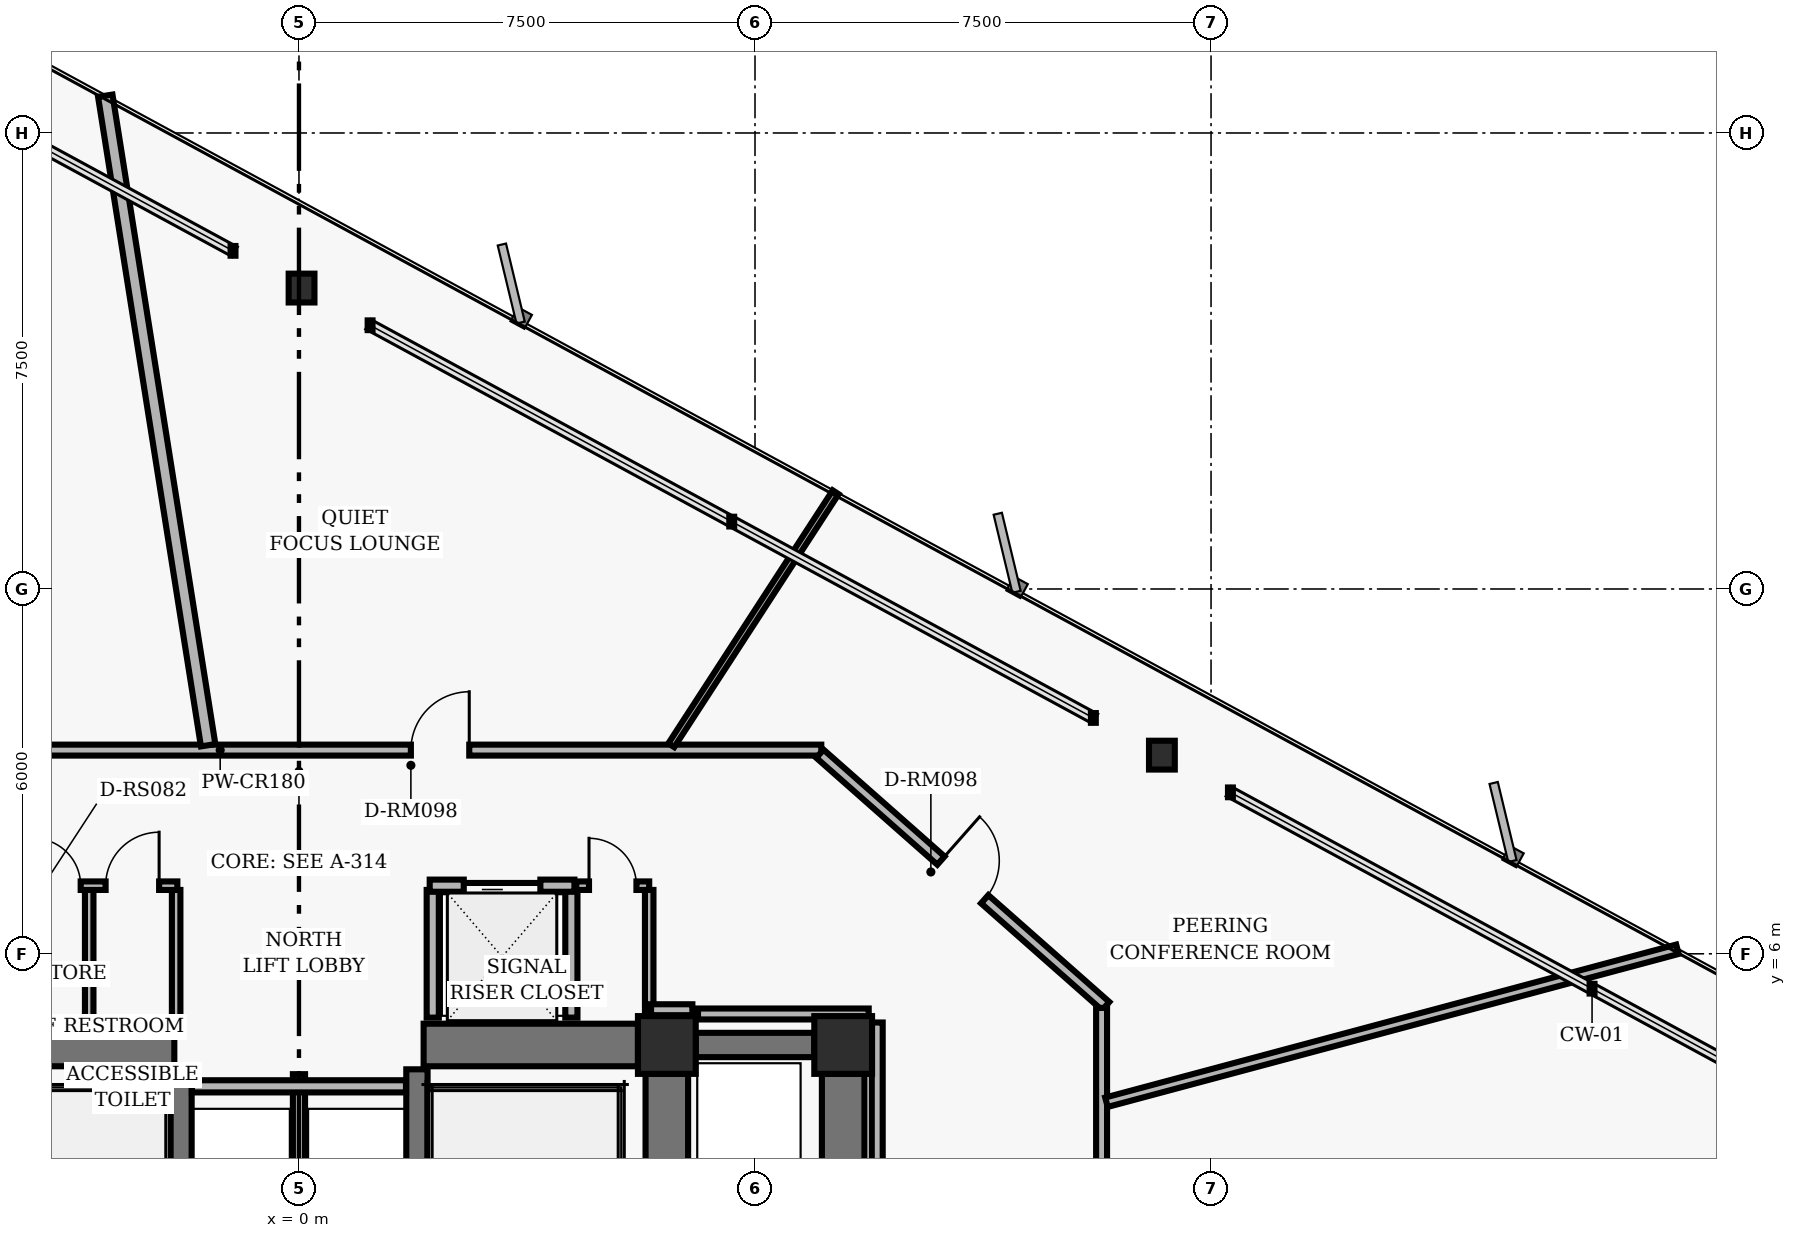
"""IFC4 building model, lengths in metres.
Left out: names, types, materials, properties, quantities, classifications, styles, units other than length and angle.
Written with IfcOpenShell. Run it as: python <this file> out.ifc"""

import sys

from ifc_helpers import new_model, si_unit, direction, frame, frame_2d, origin, origin_2d, place, context, subcontext, project, spatial, rectangle, hollow_rectangle, i_section, extrude, element, fill, save


model = new_model("IFC4")
c1 = context("Model", 3, precision=1e-05, world=origin(), true_north=direction((0.0, 1.0)))
c2 = subcontext(c1, "Body", "Model", "MODEL_VIEW")
j1 = project(units=[si_unit("LENGTHUNIT", "METRE"), si_unit("PLANEANGLEUNIT", "RADIAN")], contexts=[c1])
p1 = place(None, origin())
s1 = spatial("IfcSite", under=j1, at=p1, CompositionType="ELEMENT")
p2 = place(p1, origin())
s2 = spatial("IfcBuilding", under=s1, at=p2, CompositionType="ELEMENT")
p3 = place(p2, frame((0.0, 0.0, 32.32)))
s3 = spatial("IfcBuildingStorey", under=s2, at=p3, CompositionType="ELEMENT", Elevation=32.32)
for number, where, z_axis, x_axis in (
    (1, (6.05, 4.5, 0.0), (0.0, 0.0, 1.0), (1.0, 0.0, 0.0)),
    (2, (8.95, 4.5, 0.0), (0.0, 0.0, 1.0), (1.0, 0.0, 0.0)),
):
    element("IfcColumn", number, at=place(p3, frame(where, z_axis=z_axis, x_axis=x_axis)), inside=s3, PredefinedType="COLUMN", context=c2, shape_type="SweptSolid", body=[
        extrude(hollow_rectangle(XDim=0.95, YDim=0.95, WallThickness=0.06, InnerFilletRadius=0.02, OuterFilletRadius=0.04, at=origin_2d()), origin(), (0.0, 0.0, 1.0), 3.36),
    ])
p4 = place(p3, frame((6.05, 0.475, 0.0), z_axis=(0.0, 0.0, 1.0), x_axis=(0.0, 1.0, 0.0)))
e3 = element("IfcWall", 3, at=p4, inside=s3, PredefinedType="SHEAR", context=c2, shape_type="SweptSolid", body=[
    extrude(rectangle(XDim=3.55, YDim=0.7, at=frame_2d((1.775, 0.0))), origin(), (0.0, 0.0, 1.0), 3.098),
])
for number, where, z_axis, x_axis in (
    (4, (-1.94, -4.1, 0.0), (0.0, 0.0, 1.0), (0.0, 1.0, 0.0)),
    (5, (1.94, -4.1, 0.0), (0.0, 0.0, 1.0), (0.0, 1.0, 0.0)),
):
    element("IfcWall", number, at=place(p3, frame(where, z_axis=z_axis, x_axis=x_axis)), inside=s3, PredefinedType="SHEAR", context=c2, shape_type="SweptSolid", body=[
        extrude(rectangle(XDim=8.2, YDim=0.35, at=frame_2d((4.1, 0.0))), origin(), (0.0, 0.0, 1.0), 3.098),
    ])
for number, where, z_axis, x_axis in (
    (6, (-5.575, 4.5, 0.0), (0.0, 0.0, 1.0), (1.0, 0.0, 0.0)),
    (7, (2.05, 4.5, 0.0), (0.0, 0.0, 1.0), (1.0, 0.0, 0.0)),
):
    element("IfcWall", number, at=place(p3, frame(where, z_axis=z_axis, x_axis=x_axis)), inside=s3, PredefinedType="SHEAR", context=c2, shape_type="SweptSolid", body=[
        extrude(rectangle(XDim=3.525, YDim=0.7, at=frame_2d((1.762, 0.0))), origin(), (0.0, 0.0, 1.0), 3.098),
    ])
p5 = place(p3, frame((8.95, -3.825, 0.0), z_axis=(0.0, 0.0, 1.0), x_axis=(0.0, 1.0, 0.0)))
e8 = element("IfcWall", 8, at=p5, inside=s3, PredefinedType="SHEAR", context=c2, shape_type="SweptSolid", body=[
    extrude(rectangle(XDim=7.85, YDim=0.7, at=frame_2d((3.925, 0.0))), origin(), (0.0, 0.0, 1.0), 3.098),
])
p6 = place(p3, frame((6.525, 4.5, 0.0), z_axis=(0.0, 0.0, 1.0), x_axis=(1.0, 0.0, 0.0)))
e9 = element("IfcWall", 9, at=p6, inside=s3, PredefinedType="SHEAR", context=c2, shape_type="SweptSolid", body=[
    extrude(rectangle(XDim=1.95, YDim=0.4, at=frame_2d((0.975, 0.0))), origin(), (0.0, 0.0, 1.0), 3.098),
])
for number, where, z_axis, x_axis in (
    (10, (14.192, 9.267, 0.0), (0.0, 0.0, 1.0), (1.0, 0.0, 0.0)),
    (11, (0.043, 16.949, 0.0), (0.0, 0.0, 1.0), (1.0, 0.0, 0.0)),
):
    element("IfcColumn", number, at=place(p3, frame(where, z_axis=z_axis, x_axis=x_axis)), inside=s3, PredefinedType="COLUMN", context=c2, shape_type="SweptSolid", body=[
        extrude(i_section(OverallWidth=0.424, OverallDepth=0.474, WebThickness=0.048, FlangeThickness=0.077, FilletRadius=0.025, at=origin_2d()), origin(), (0.0, 0.0, 1.0), 3.36),
    ])
p7 = place(p3, frame((0.0, 1.25, 0.0), z_axis=(0.0, 0.0, 1.0), x_axis=(0.0, 1.0, 0.0)))
e12 = element("IfcWall", 12, at=p7, inside=s3, PredefinedType="PARTITIONING", context=c2, shape_type="SweptSolid", body=[
    extrude(rectangle(XDim=2.77, YDim=0.2, at=frame_2d((1.385, 0.0))), origin(), (0.0, 0.0, 1.0), 3.073),
])
p8 = place(p3, frame((-1.76, 3.82, 0.0), z_axis=(0.0, 0.0, 1.0), x_axis=(1.0, 0.0, 0.0)))
e13 = element("IfcWall", 13, at=p8, inside=s3, PredefinedType="PARTITIONING", context=c2, shape_type="SweptSolid", body=[
    extrude(rectangle(XDim=3.52, YDim=0.2, at=frame_2d((1.76, 0.0))), origin(), (0.0, 0.0, 1.0), 3.073),
])
for number, where, z_axis, x_axis in (
    (14, (2.2, 4.95, 0.0), (0.0, 0.0, 1.0), (0.0, 1.0, 0.0)),
    (15, (4.48, 4.95, 0.0), (0.0, 0.0, 1.0), (0.0, 1.0, 0.0)),
):
    element("IfcWall", number, at=place(p3, frame(where, z_axis=z_axis, x_axis=x_axis)), inside=s3, PredefinedType="PARTITIONING", context=c2, shape_type="SweptSolid", body=[
        extrude(rectangle(XDim=2.1, YDim=0.2, at=frame_2d((1.05, 0.0))), origin(), (0.0, 0.0, 1.0), 3.073),
    ])
p9 = place(p3, frame((2.15, 7.12, 0.0), z_axis=(0.0, 0.0, 1.0), x_axis=(1.0, 0.0, 0.0)))
e16 = element("IfcWall", 16, at=p9, inside=s3, PredefinedType="PARTITIONING", context=c2, shape_type="SweptSolid", body=[
    extrude(rectangle(XDim=2.38, YDim=0.2, at=frame_2d((1.19, 0.0))), origin(), (0.0, 0.0, 1.0), 3.073),
])
p10 = place(p9, frame((0.56, 0.0, 0.0)))
e17 = element("IfcOpeningElement", 17, at=p10, cuts=e16, PredefinedType="OPENING", context=c2, shape_type="SweptSolid", body=[
    extrude(rectangle(XDim=1.26, YDim=2.06, at=frame_2d((0.63, 1.03))), frame((0.0, 0.11, 0.0), z_axis=(0.0, -1.0, 0.0), x_axis=(1.0, 0.0, 0.0)), (0.0, 0.0, 1.0), 0.22),
])
for number, where, z_axis, x_axis in (
    (18, (-3.45, 4.95, 0.0), (0.0, 0.0, 1.0), (0.0, 1.0, 0.0)),
    (19, (-2.02, 4.95, 0.0), (0.0, 0.0, 1.0), (0.0, 1.0, 0.0)),
):
    element("IfcWall", number, at=place(p3, frame(where, z_axis=z_axis, x_axis=x_axis)), inside=s3, PredefinedType="PARTITIONING", context=c2, shape_type="SweptSolid", body=[
        extrude(rectangle(XDim=2.1, YDim=0.14, at=frame_2d((1.05, 0.0))), origin(), (0.0, 0.0, 1.0), 3.073),
    ])
p11 = place(p3, frame((-5.52, 7.12, 0.0), z_axis=(0.0, 0.0, 1.0), x_axis=(1.0, 0.0, 0.0)))
e20 = element("IfcWall", 20, at=p11, inside=s3, PredefinedType="PARTITIONING", context=c2, shape_type="SweptSolid", body=[
    extrude(rectangle(XDim=3.52, YDim=0.14, at=frame_2d((1.76, 0.0))), origin(), (0.0, 0.0, 1.0), 3.073),
])
p12 = place(p11, frame((0.14, 0.0, 0.0)))
e21 = element("IfcOpeningElement", 21, at=p12, cuts=e20, PredefinedType="OPENING", context=c2, shape_type="SweptSolid", body=[
    extrude(rectangle(XDim=0.78, YDim=2.01, at=frame_2d((0.39, 1.005))), frame((0.0, 0.08, 0.0), z_axis=(0.0, -1.0, 0.0), x_axis=(1.0, 0.0, 0.0)), (0.0, 0.0, 1.0), 0.16),
])
p13 = place(p11, frame((1.15, 0.0, 0.0)))
e22 = element("IfcOpeningElement", 22, at=p13, cuts=e20, PredefinedType="OPENING", context=c2, shape_type="SweptSolid", body=[
    extrude(rectangle(XDim=0.78, YDim=2.01, at=frame_2d((0.39, 1.005))), frame((0.0, 0.08, 0.0), z_axis=(0.0, -1.0, 0.0), x_axis=(1.0, 0.0, 0.0)), (0.0, 0.0, 1.0), 0.16),
])
p14 = place(p11, frame((2.34, 0.0, 0.0)))
e23 = element("IfcOpeningElement", 23, at=p14, cuts=e20, PredefinedType="OPENING", context=c2, shape_type="SweptSolid", body=[
    extrude(rectangle(XDim=0.88, YDim=2.02, at=frame_2d((0.44, 1.01))), frame((0.0, 0.08, 0.0), z_axis=(0.0, -1.0, 0.0), x_axis=(1.0, 0.0, 0.0)), (0.0, 0.0, 1.0), 0.16),
])
p15 = place(p3, frame((5.76, 4.95, 0.0), z_axis=(0.0, 0.0, 1.0), x_axis=(0.0, 1.0, 0.0)))
e24 = element("IfcWall", 24, at=p15, inside=s3, PredefinedType="PARTITIONING", context=c2, shape_type="SweptSolid", body=[
    extrude(rectangle(XDim=2.1, YDim=0.14, at=frame_2d((1.05, 0.0))), origin(), (0.0, 0.0, 1.0), 3.073),
])
p16 = place(p3, frame((4.56, 7.12, 0.0), z_axis=(0.0, 0.0, 1.0), x_axis=(1.0, 0.0, 0.0)))
e25 = element("IfcWall", 25, at=p16, inside=s3, PredefinedType="PARTITIONING", context=c2, shape_type="SweptSolid", body=[
    extrude(rectangle(XDim=1.2, YDim=0.14, at=frame_2d((0.6, 0.0))), origin(), (0.0, 0.0, 1.0), 3.073),
])
p17 = place(p16, frame((0.21, 0.0, 0.0)))
e26 = element("IfcOpeningElement", 26, at=p17, cuts=e25, PredefinedType="OPENING", context=c2, shape_type="SweptSolid", body=[
    extrude(rectangle(XDim=0.78, YDim=2.01, at=frame_2d((0.39, 1.005))), frame((0.0, 0.08, 0.0), z_axis=(0.0, -1.0, 0.0), x_axis=(1.0, 0.0, 0.0)), (0.0, 0.0, 1.0), 0.16),
])
p18 = place(p3, frame((-8.59, 9.35, 0.0), z_axis=(0.0, 0.0, 1.0), x_axis=(1.0, 0.0, 0.0)))
e27 = element("IfcWall", 27, at=p18, inside=s3, PredefinedType="PARTITIONING", context=c2, shape_type="SweptSolid", body=[
    extrude(rectangle(XDim=17.18, YDim=0.18, at=frame_2d((8.59, 0.0))), origin(), (0.0, 0.0, 1.0), 2.587),
])
p19 = place(p18, frame((10.43, 0.0, 0.0)))
e28 = element("IfcOpeningElement", 28, at=p19, cuts=e27, PredefinedType="OPENING", context=c2, shape_type="SweptSolid", body=[
    extrude(rectangle(XDim=0.96, YDim=2.02, at=frame_2d((0.48, 1.01))), frame((0.0, 0.1, 0.0), z_axis=(0.0, -1.0, 0.0), x_axis=(1.0, 0.0, 0.0)), (0.0, 0.0, 1.0), 0.2),
])
p20 = place(p18, frame((3.198, 0.0, 0.0)))
e29 = element("IfcOpeningElement", 29, at=p20, cuts=e27, PredefinedType="OPENING", context=c2, shape_type="SweptSolid", body=[
    extrude(rectangle(XDim=0.96, YDim=2.02, at=frame_2d((0.48, 1.01))), frame((0.0, 0.1, 0.0), z_axis=(0.0, -1.0, 0.0), x_axis=(1.0, 0.0, 0.0)), (0.0, 0.0, 1.0), 0.2),
])
p21 = place(p3, frame((8.567, 9.29, 0.0), z_axis=(0.0, 0.0, 1.0), x_axis=(0.749626463267, -0.66186113768, 0.0)))
e30 = element("IfcWall", 30, at=p21, inside=s3, PredefinedType="PARTITIONING", context=c2, shape_type="SweptSolid", body=[
    extrude(rectangle(XDim=6.27, YDim=0.18, at=frame_2d((3.135, 0.0))), origin(), (0.0, 0.0, 1.0), 2.587),
])
p22 = place(p21, frame((2.655, 0.0, 0.0)))
e31 = element("IfcOpeningElement", 31, at=p22, cuts=e30, PredefinedType="OPENING", context=c2, shape_type="SweptSolid", body=[
    extrude(rectangle(XDim=0.96, YDim=2.02, at=frame_2d((0.48, 1.01))), frame((0.0, 0.1, 0.0), z_axis=(0.0, -1.0, 0.0), x_axis=(1.0, 0.0, 0.0)), (0.0, 0.0, 1.0), 0.2),
])
p23 = place(p3, frame((13.2, 5.11, 0.0), z_axis=(0.0, 0.0, 1.0), x_axis=(0.0, -1.0, 0.0)))
e32 = element("IfcWall", 32, at=p23, inside=s3, PredefinedType="PARTITIONING", context=c2, shape_type="SweptSolid", body=[
    extrude(rectangle(XDim=10.22, YDim=0.18, at=frame_2d((5.11, 0.0))), origin(), (0.0, 0.0, 1.0), 3.073),
])
p24 = place(p23, frame((5.277, 0.0, 0.0)))
e33 = element("IfcOpeningElement", 33, at=p24, cuts=e32, PredefinedType="OPENING", context=c2, shape_type="SweptSolid", body=[
    extrude(rectangle(XDim=0.96, YDim=2.02, at=frame_2d((0.48, 1.01))), frame((0.0, 0.1, 0.0), z_axis=(0.0, -1.0, 0.0), x_axis=(1.0, 0.0, 0.0)), (0.0, 0.0, 1.0), 0.2),
])
p25 = place(p3, frame((9.51, -4.87, 0.0), z_axis=(0.0, 0.0, 1.0), x_axis=(0.0, 1.0, 0.0)))
e34 = element("IfcWall", 34, at=p25, inside=s3, PredefinedType="PARTITIONING", context=c2, shape_type="SweptSolid", body=[
    extrude(rectangle(XDim=9.74, YDim=0.18, at=frame_2d((4.87, 0.0))), origin(), (0.0, 0.0, 1.0), 3.073),
])
p26 = place(p3, frame((9.37, 5.01, 0.0), z_axis=(0.0, 0.0, 1.0), x_axis=(-1.0, 0.0, 0.0)))
e35 = element("IfcWall", 35, at=p26, inside=s3, PredefinedType="PARTITIONING", context=c2, shape_type="SweptSolid", body=[
    extrude(rectangle(XDim=2.808, YDim=0.18, at=frame_2d((1.404, 0.0))), origin(), (0.0, 0.0, 1.0), 3.073),
])
p27 = place(p3, frame((6.47, 5.08, 0.0), z_axis=(0.0, 0.0, 1.0), x_axis=(-1.0, 0.0, 0.0)))
e36 = element("IfcWall", 36, at=p27, inside=s3, PredefinedType="PARTITIONING", context=c2, shape_type="SweptSolid", body=[
    extrude(rectangle(XDim=0.68, YDim=0.18, at=frame_2d((0.34, 0.0))), origin(), (0.0, 0.0, 1.0), 3.073),
])
p28 = place(p3, frame((13.28, 3.558, 0.0), z_axis=(0.0, 0.0, 1.0), x_axis=(0.965926641133, 0.258816004043, 0.0)))
e37 = element("IfcWall", 37, at=p28, inside=s3, PredefinedType="PARTITIONING", context=c2, shape_type="SweptSolid", body=[
    extrude(rectangle(XDim=9.722, YDim=0.16, at=frame_2d((4.861, 0.0))), origin(), (0.0, 0.0, 1.0), 3.073),
])
p29 = place(p3, frame((6.124, 9.43, 0.0), z_axis=(0.0, 0.0, 1.0), x_axis=(0.544668366902, 0.838651518866, 0.0)))
e38 = element("IfcWall", 38, at=p29, inside=s3, PredefinedType="MOVABLE", context=c2, shape_type="SweptSolid", body=[
    extrude(rectangle(XDim=4.962, YDim=0.115, at=frame_2d((2.481, 0.0))), origin(), (0.0, 0.0, 1.0), 3.073),
])
p30 = place(p3, frame((-1.494, 9.43, 0.0), z_axis=(0.0, 0.0, 1.0), x_axis=(-0.156418067091, 0.987690937636, 0.0)))
e39 = element("IfcWall", 39, at=p30, inside=s3, PredefinedType="PARTITIONING", context=c2, shape_type="SweptSolid", body=[
    extrude(rectangle(XDim=10.816, YDim=0.24, at=frame_2d((5.408, 0.0))), origin(), (0.0, 0.0, 1.0), 3.073),
])
p31 = place(p10, origin())
e40 = element("IfcDoor", 40, at=p31, inside=s3, OperationType="SLIDING_TO_LEFT", PredefinedType="DOOR", context=c2, shape_type="SweptSolid", body=[
    extrude(rectangle(XDim=1.26, YDim=2.06, at=frame_2d((0.63, 1.03))), frame((0.0, 0.025, 0.0), z_axis=(0.0, -1.0, 0.0), x_axis=(1.0, 0.0, 0.0)), (0.0, 0.0, 1.0), 0.05),
])
fill(e17, e40)
p32 = place(p13, origin())
e41 = element("IfcDoor", 41, at=p32, inside=s3, OperationType="SINGLE_SWING_LEFT", PredefinedType="DOOR", context=c2, shape_type="SweptSolid", body=[
    extrude(rectangle(XDim=0.78, YDim=2.01, at=frame_2d((0.39, 1.005))), frame((0.0, 0.025, 0.0), z_axis=(0.0, -1.0, 0.0), x_axis=(1.0, 0.0, 0.0)), (0.0, 0.0, 1.0), 0.05),
])
fill(e22, e41)
p33 = place(p14, origin())
e42 = element("IfcDoor", 42, at=p33, inside=s3, OperationType="SINGLE_SWING_RIGHT", PredefinedType="DOOR", context=c2, shape_type="SweptSolid", body=[
    extrude(rectangle(XDim=0.88, YDim=2.02, at=frame_2d((0.44, 1.01))), frame((0.0, 0.025, 0.0), z_axis=(0.0, -1.0, 0.0), x_axis=(1.0, 0.0, 0.0)), (0.0, 0.0, 1.0), 0.05),
])
fill(e23, e42)
p34 = place(p17, origin())
e43 = element("IfcDoor", 43, at=p34, inside=s3, OperationType="SINGLE_SWING_LEFT", PredefinedType="DOOR", context=c2, shape_type="SweptSolid", body=[
    extrude(rectangle(XDim=0.78, YDim=2.01, at=frame_2d((0.39, 1.005))), frame((0.0, 0.025, 0.0), z_axis=(0.0, -1.0, 0.0), x_axis=(1.0, 0.0, 0.0)), (0.0, 0.0, 1.0), 0.05),
])
fill(e26, e43)
p35 = place(p22, origin())
e44 = element("IfcDoor", 44, at=p35, inside=s3, OperationType="SINGLE_SWING_LEFT", PredefinedType="DOOR", context=c2, shape_type="SweptSolid", body=[
    extrude(rectangle(XDim=0.96, YDim=2.02, at=frame_2d((0.48, 1.01))), frame((0.0, 0.025, 0.0), z_axis=(0.0, -1.0, 0.0), x_axis=(1.0, 0.0, 0.0)), (0.0, 0.0, 1.0), 0.05),
])
fill(e31, e44)
p36 = place(p19, origin())
e45 = element("IfcDoor", 45, at=p36, inside=s3, OperationType="SINGLE_SWING_RIGHT", PredefinedType="DOOR", context=c2, shape_type="SweptSolid", body=[
    extrude(rectangle(XDim=0.96, YDim=2.02, at=frame_2d((0.48, 1.01))), frame((0.0, 0.025, 0.0), z_axis=(0.0, -1.0, 0.0), x_axis=(1.0, 0.0, 0.0)), (0.0, 0.0, 1.0), 0.05),
])
fill(e28, e45)
save(model, sys.argv[1])
